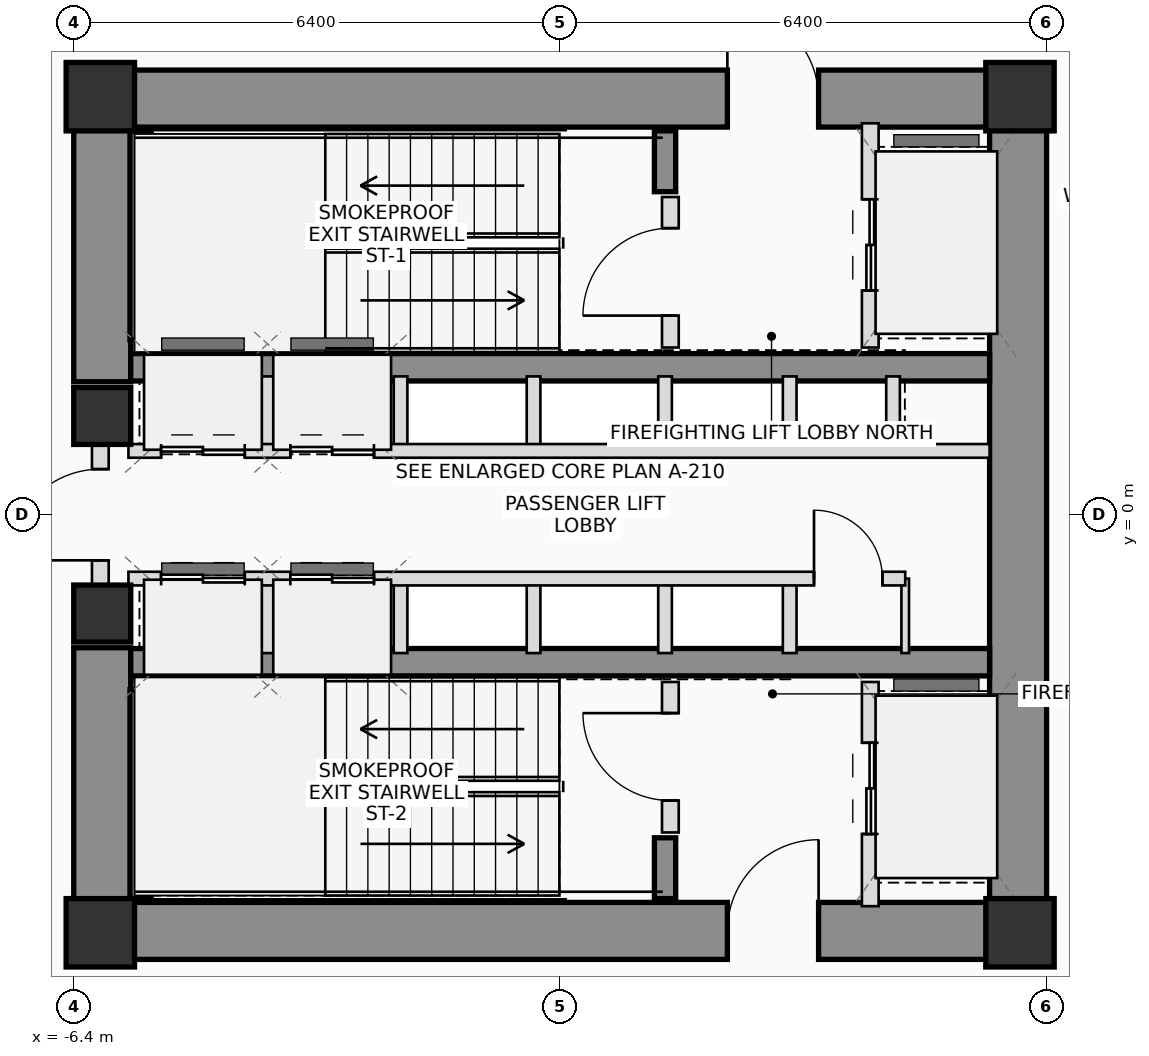
"""IFC4 building model, lengths in metres.
Left out: names, types, materials, properties, quantities, classifications, styles, units other than length and angle.
Written with IfcOpenShell. Run it as: python <this file> out.ifc"""

import sys

from ifc_helpers import new_model, si_unit, direction, frame, frame_2d, origin, origin_2d, place, context, subcontext, project, spatial, rectangle, extrude, source, transform, mapped, element, fill, save


model = new_model("IFC4")
c1 = context("Model", 3, precision=1e-05, world=origin(), true_north=direction((0.0, 1.0)))
c2 = subcontext(c1, "Body", "Model", "MODEL_VIEW")
j1 = project(units=[si_unit("LENGTHUNIT", "METRE"), si_unit("PLANEANGLEUNIT", "RADIAN")], contexts=[c1])
p1 = place(None, origin())
s1 = spatial("IfcSite", under=j1, at=p1, CompositionType="ELEMENT")
p2 = place(p1, origin())
s2 = spatial("IfcBuilding", under=s1, at=p2, CompositionType="ELEMENT")
p3 = place(p2, frame((0.0, 0.0, 116.15)))
s3 = spatial("IfcBuildingStorey", under=s2, at=p3, CompositionType="ELEMENT", Elevation=116.15)
m1 = source(origin(), c2, "Body", "SweptSolid", [
    extrude(rectangle(XDim=0.9, YDim=0.9, at=origin_2d()), origin(), (0.0, 0.0, 1.0), 3.75),
])
for number, where, z_axis, x_axis in (
    (1, (-6.05, -5.5, 0.0), (0.0, 0.0, 1.0), (1.0, 0.0, 0.0)),
    (2, (6.05, -5.5, 0.0), (0.0, 0.0, 1.0), (1.0, 0.0, 0.0)),
    (3, (6.05, 5.5, 0.0), (0.0, 0.0, 1.0), (1.0, 0.0, 0.0)),
    (4, (-6.05, 5.5, 0.0), (0.0, 0.0, 1.0), (1.0, 0.0, 0.0)),
):
    element("IfcColumn", number, at=place(p3, frame(where, z_axis=z_axis, x_axis=x_axis)), inside=s3, PredefinedType="COLUMN", context=c2, shape_type="MappedRepresentation", body=[
        mapped(m1, transform((0.0, 0.0, 0.0), scale=1.0)),
    ])
p4 = place(p3, frame((-6.4, 5.475, 0.0), z_axis=(0.0, 0.0, 1.0), x_axis=(1.0, 0.0, 0.0)))
e5 = element("IfcWall", 5, at=p4, inside=s3, PredefinedType="SHEAR", context=c2, shape_type="SweptSolid", body=[
    extrude(rectangle(XDim=12.8, YDim=0.75, at=frame_2d((6.4, 0.0))), origin(), (0.0, 0.0, 1.0), 3.75),
])
p5 = place(p4, frame((8.6, 0.0, 0.0)))
e6 = element("IfcOpeningElement", 6, at=p5, cuts=e5, PredefinedType="OPENING", context=c2, shape_type="SweptSolid", body=[
    extrude(rectangle(XDim=1.2, YDim=2.2, at=frame_2d((0.6, 1.1))), frame((0.0, 0.385, 0.0), z_axis=(0.0, -1.0, 0.0), x_axis=(1.0, 0.0, 0.0)), (0.0, 0.0, 1.0), 0.77),
])
p6 = place(p3, frame((-6.4, -5.475, 0.0), z_axis=(0.0, 0.0, 1.0), x_axis=(1.0, 0.0, 0.0)))
e7 = element("IfcWall", 7, at=p6, inside=s3, PredefinedType="SHEAR", context=c2, shape_type="SweptSolid", body=[
    extrude(rectangle(XDim=12.8, YDim=0.75, at=frame_2d((6.4, 0.0))), origin(), (0.0, 0.0, 1.0), 3.75),
])
p7 = place(p6, frame((8.6, 0.0, 0.0)))
e8 = element("IfcOpeningElement", 8, at=p7, cuts=e7, PredefinedType="OPENING", context=c2, shape_type="SweptSolid", body=[
    extrude(rectangle(XDim=1.2, YDim=2.2, at=frame_2d((0.6, 1.1))), frame((0.0, 0.385, 0.0), z_axis=(0.0, -1.0, 0.0), x_axis=(1.0, 0.0, 0.0)), (0.0, 0.0, 1.0), 0.77),
])
p8 = place(p3, frame((6.025, -5.1, 0.0), z_axis=(0.0, 0.0, 1.0), x_axis=(0.0, 1.0, 0.0)))
e9 = element("IfcWall", 9, at=p8, inside=s3, PredefinedType="SHEAR", context=c2, shape_type="SweptSolid", body=[
    extrude(rectangle(XDim=10.2, YDim=0.75, at=frame_2d((5.1, 0.0))), origin(), (0.0, 0.0, 1.0), 3.75),
])
for number, where, z_axis, x_axis in (
    (10, (-6.025, -5.1, 0.0), (0.0, 0.0, 1.0), (0.0, 1.0, 0.0)),
    (11, (-6.025, 1.75, 0.0), (0.0, 0.0, 1.0), (0.0, 1.0, 0.0)),
):
    element("IfcWall", number, at=place(p3, frame(where, z_axis=z_axis, x_axis=x_axis)), inside=s3, PredefinedType="SHEAR", context=c2, shape_type="SweptSolid", body=[
        extrude(rectangle(XDim=3.35, YDim=0.75, at=frame_2d((1.675, 0.0))), origin(), (0.0, 0.0, 1.0), 3.75),
    ])
for number, where, z_axis, x_axis in (
    (12, (-5.65, 1.94, 0.0), (0.0, 0.0, 1.0), (1.0, 0.0, 0.0)),
    (13, (-5.65, -1.94, 0.0), (0.0, 0.0, 1.0), (1.0, 0.0, 0.0)),
):
    element("IfcWall", number, at=place(p3, frame(where, z_axis=z_axis, x_axis=x_axis)), inside=s3, PredefinedType="SHEAR", context=c2, shape_type="SweptSolid", body=[
        extrude(rectangle(XDim=11.3, YDim=0.36, at=frame_2d((5.65, 0.0))), origin(), (0.0, 0.0, 1.0), 3.75),
    ])
p9 = place(p3, frame((-5.52, 2.3, 0.0), z_axis=(0.0, 0.0, 1.0), x_axis=(0.0, 1.0, 0.0)))
e14 = element("IfcWall", 14, at=p9, inside=s3, PredefinedType="SHEAR", context=c2, shape_type="SweptSolid", body=[
    extrude(rectangle(XDim=2.75, YDim=0.28, at=frame_2d((1.375, 0.0))), origin(), (0.0, 0.0, 1.0), 3.75),
])
p10 = place(p3, frame((1.38, 4.25, 0.0), z_axis=(0.0, 0.0, 1.0), x_axis=(0.0, 1.0, 0.0)))
e15 = element("IfcWall", 15, at=p10, inside=s3, PredefinedType="SHEAR", context=c2, shape_type="SweptSolid", body=[
    extrude(rectangle(XDim=0.8, YDim=0.28, at=frame_2d((0.4, 0.0))), origin(), (0.0, 0.0, 1.0), 3.75),
])
p11 = place(p3, frame((-5.52, -5.05, 0.0), z_axis=(0.0, 0.0, 1.0), x_axis=(0.0, 1.0, 0.0)))
e16 = element("IfcWall", 16, at=p11, inside=s3, PredefinedType="SHEAR", context=c2, shape_type="SweptSolid", body=[
    extrude(rectangle(XDim=2.75, YDim=0.28, at=frame_2d((1.375, 0.0))), origin(), (0.0, 0.0, 1.0), 3.75),
])
p12 = place(p3, frame((1.38, -5.05, 0.0), z_axis=(0.0, 0.0, 1.0), x_axis=(0.0, 1.0, 0.0)))
e17 = element("IfcWall", 17, at=p12, inside=s3, PredefinedType="SHEAR", context=c2, shape_type="SweptSolid", body=[
    extrude(rectangle(XDim=0.8, YDim=0.28, at=frame_2d((0.4, 0.0))), origin(), (0.0, 0.0, 1.0), 3.75),
])
m2 = source(origin(), c2, "Body", "SweptSolid", [
    extrude(rectangle(XDim=0.75, YDim=0.75, at=origin_2d()), origin(), (0.0, 0.0, 1.0), 3.75),
])
for number, where, z_axis, x_axis in (
    (18, (-6.025, -1.3, 0.0), (0.0, 0.0, 1.0), (1.0, 0.0, 0.0)),
    (19, (-6.025, 1.3, 0.0), (0.0, 0.0, 1.0), (1.0, 0.0, 0.0)),
):
    element("IfcColumn", number, at=place(p3, frame(where, z_axis=z_axis, x_axis=x_axis)), inside=s3, PredefinedType="COLUMN", context=c2, shape_type="MappedRepresentation", body=[
        mapped(m2, transform((0.0, 0.0, 0.0), scale=1.0)),
    ])
p13 = place(p3, frame((-6.05, -0.95, 0.0), z_axis=(0.0, 0.0, 1.0), x_axis=(0.0, 1.0, 0.0)))
e20 = element("IfcWall", 20, at=p13, inside=s3, PredefinedType="PLUMBINGWALL", context=c2, shape_type="SweptSolid", body=[
    extrude(rectangle(XDim=1.9, YDim=0.22, at=frame_2d((0.95, 0.0))), origin(), (0.0, 0.0, 1.0), 2.49),
])
p14 = place(p13, frame((0.35, 0.0, 0.0)))
e21 = element("IfcOpeningElement", 21, at=p14, cuts=e20, PredefinedType="OPENING", context=c2, shape_type="SweptSolid", body=[
    extrude(rectangle(XDim=1.2, YDim=2.2, at=frame_2d((0.6, 1.1))), frame((0.0, 0.12, 0.0), z_axis=(0.0, -1.0, 0.0), x_axis=(1.0, 0.0, 0.0)), (0.0, 0.0, 1.0), 0.24),
])
p15 = place(p3, frame((1.45, 2.2, 0.0), z_axis=(0.0, 0.0, 1.0), x_axis=(0.0, 1.0, 0.0)))
e22 = element("IfcWall", 22, at=p15, inside=s3, PredefinedType="PLUMBINGWALL", context=c2, shape_type="SweptSolid", body=[
    extrude(rectangle(XDim=1.98, YDim=0.22, at=frame_2d((0.99, 0.0))), origin(), (0.0, 0.0, 1.0), 3.51),
])
p16 = place(p15, frame((0.42, 0.0, 0.0)))
e23 = element("IfcOpeningElement", 23, at=p16, cuts=e22, PredefinedType="OPENING", context=c2, shape_type="SweptSolid", body=[
    extrude(rectangle(XDim=1.15, YDim=2.15, at=frame_2d((0.575, 1.075))), frame((0.0, 0.12, 0.0), z_axis=(0.0, -1.0, 0.0), x_axis=(1.0, 0.0, 0.0)), (0.0, 0.0, 1.0), 0.24),
])
p17 = place(p3, frame((4.08, 2.2, 0.0), z_axis=(0.0, 0.0, 1.0), x_axis=(0.0, 1.0, 0.0)))
e24 = element("IfcWall", 24, at=p17, inside=s3, PredefinedType="PLUMBINGWALL", context=c2, shape_type="SweptSolid", body=[
    extrude(rectangle(XDim=2.95, YDim=0.22, at=frame_2d((1.475, 0.0))), origin(), (0.0, 0.0, 1.0), 3.51),
])
p18 = place(p17, frame((0.75, 0.0, 0.0)))
e25 = element("IfcOpeningElement", 25, at=p18, cuts=e24, PredefinedType="OPENING", context=c2, shape_type="SweptSolid", body=[
    extrude(rectangle(XDim=1.2, YDim=2.25, at=frame_2d((0.6, 1.125))), frame((0.0, 0.12, 0.0), z_axis=(0.0, -1.0, 0.0), x_axis=(1.0, 0.0, 0.0)), (0.0, 0.0, 1.0), 0.24),
])
p19 = place(p3, frame((1.45, -4.18, 0.0), z_axis=(0.0, 0.0, 1.0), x_axis=(0.0, 1.0, 0.0)))
e26 = element("IfcWall", 26, at=p19, inside=s3, PredefinedType="PLUMBINGWALL", context=c2, shape_type="SweptSolid", body=[
    extrude(rectangle(XDim=1.98, YDim=0.22, at=frame_2d((0.99, 0.0))), origin(), (0.0, 0.0, 1.0), 3.51),
])
p20 = place(p19, frame((0.42, 0.0, 0.0)))
e27 = element("IfcOpeningElement", 27, at=p20, cuts=e26, PredefinedType="OPENING", context=c2, shape_type="SweptSolid", body=[
    extrude(rectangle(XDim=1.15, YDim=2.15, at=frame_2d((0.575, 1.075))), frame((0.0, 0.12, 0.0), z_axis=(0.0, -1.0, 0.0), x_axis=(1.0, 0.0, 0.0)), (0.0, 0.0, 1.0), 0.24),
])
p21 = place(p3, frame((4.08, -5.15, 0.0), z_axis=(0.0, 0.0, 1.0), x_axis=(0.0, 1.0, 0.0)))
e28 = element("IfcWall", 28, at=p21, inside=s3, PredefinedType="PLUMBINGWALL", context=c2, shape_type="SweptSolid", body=[
    extrude(rectangle(XDim=2.95, YDim=0.22, at=frame_2d((1.475, 0.0))), origin(), (0.0, 0.0, 1.0), 3.51),
])
p22 = place(p21, frame((0.95, 0.0, 0.0)))
e29 = element("IfcOpeningElement", 29, at=p22, cuts=e28, PredefinedType="OPENING", context=c2, shape_type="SweptSolid", body=[
    extrude(rectangle(XDim=1.2, YDim=2.25, at=frame_2d((0.6, 1.125))), frame((0.0, 0.12, 0.0), z_axis=(0.0, -1.0, 0.0), x_axis=(1.0, 0.0, 0.0)), (0.0, 0.0, 1.0), 0.24),
])
for number, where, z_axis, x_axis in (
    (30, (-3.85, 0.84, 0.0), (0.0, 0.0, 1.0), (0.0, 1.0, 0.0)),
    (31, (-3.85, -1.82, 0.0), (0.0, 0.0, 1.0), (0.0, 1.0, 0.0)),
    (32, (-2.1, 0.84, 0.0), (0.0, 0.0, 1.0), (0.0, 1.0, 0.0)),
    (33, (-2.1, -1.82, 0.0), (0.0, 0.0, 1.0), (0.0, 1.0, 0.0)),
    (34, (-0.35, 0.84, 0.0), (0.0, 0.0, 1.0), (0.0, 1.0, 0.0)),
    (35, (-0.35, -1.82, 0.0), (0.0, 0.0, 1.0), (0.0, 1.0, 0.0)),
    (36, (1.38, 0.84, 0.0), (0.0, 0.0, 1.0), (0.0, 1.0, 0.0)),
    (37, (1.38, -1.82, 0.0), (0.0, 0.0, 1.0), (0.0, 1.0, 0.0)),
    (38, (3.02, 0.84, 0.0), (0.0, 0.0, 1.0), (0.0, 1.0, 0.0)),
    (39, (4.38, 0.84, 0.0), (0.0, 0.0, 1.0), (0.0, 1.0, 0.0)),
    (40, (3.02, -1.82, 0.0), (0.0, 0.0, 1.0), (0.0, 1.0, 0.0)),
):
    element("IfcWall", number, at=place(p3, frame(where, z_axis=z_axis, x_axis=x_axis)), inside=s3, PredefinedType="PLUMBINGWALL", context=c2, shape_type="SweptSolid", body=[
        extrude(rectangle(XDim=0.98, YDim=0.18, at=frame_2d((0.49, 0.0))), origin(), (0.0, 0.0, 1.0), 3.51),
    ])
p23 = place(p3, frame((4.54, -1.82, 0.0), z_axis=(0.0, 0.0, 1.0), x_axis=(0.0, 1.0, 0.0)))
e41 = element("IfcWall", 41, at=p23, inside=s3, PredefinedType="PARTITIONING", context=c2, shape_type="SweptSolid", body=[
    extrude(rectangle(XDim=0.98, YDim=0.1, at=frame_2d((0.49, 0.0))), origin(), (0.0, 0.0, 1.0), 3.51),
])
p24 = place(p3, frame((-5.68, 0.84, 0.0), z_axis=(0.0, 0.0, 1.0), x_axis=(1.0, 0.0, 0.0)))
e42 = element("IfcWall", 42, at=p24, inside=s3, PredefinedType="PLUMBINGWALL", context=c2, shape_type="SweptSolid", body=[
    extrude(rectangle(XDim=11.33, YDim=0.18, at=frame_2d((5.665, 0.0))), origin(), (0.0, 0.0, 1.0), 3.51),
])
p25 = place(p24, frame((0.43, 0.0, 0.0)))
e43 = element("IfcOpeningElement", 43, at=p25, cuts=e42, PredefinedType="OPENING", context=c2, shape_type="SweptSolid", body=[
    extrude(rectangle(XDim=1.1, YDim=2.2, at=frame_2d((0.55, 1.1))), frame((0.0, 0.1, 0.0), z_axis=(0.0, -1.0, 0.0), x_axis=(1.0, 0.0, 0.0)), (0.0, 0.0, 1.0), 0.2),
])
p26 = place(p24, frame((2.13, 0.0, 0.0)))
e44 = element("IfcOpeningElement", 44, at=p26, cuts=e42, PredefinedType="OPENING", context=c2, shape_type="SweptSolid", body=[
    extrude(rectangle(XDim=1.1, YDim=2.2, at=frame_2d((0.55, 1.1))), frame((0.0, 0.1, 0.0), z_axis=(0.0, -1.0, 0.0), x_axis=(1.0, 0.0, 0.0)), (0.0, 0.0, 1.0), 0.2),
])
p27 = place(p3, frame((-5.68, -0.84, 0.0), z_axis=(0.0, 0.0, 1.0), x_axis=(1.0, 0.0, 0.0)))
e45 = element("IfcWall", 45, at=p27, inside=s3, PredefinedType="PLUMBINGWALL", context=c2, shape_type="SweptSolid", body=[
    extrude(rectangle(XDim=10.22, YDim=0.18, at=frame_2d((5.11, 0.0))), origin(), (0.0, 0.0, 1.0), 3.51),
])
p28 = place(p27, frame((0.43, 0.0, 0.0)))
e46 = element("IfcOpeningElement", 46, at=p28, cuts=e45, PredefinedType="OPENING", context=c2, shape_type="SweptSolid", body=[
    extrude(rectangle(XDim=1.1, YDim=2.2, at=frame_2d((0.55, 1.1))), frame((0.0, 0.1, 0.0), z_axis=(0.0, -1.0, 0.0), x_axis=(1.0, 0.0, 0.0)), (0.0, 0.0, 1.0), 0.2),
])
p29 = place(p27, frame((2.13, 0.0, 0.0)))
e47 = element("IfcOpeningElement", 47, at=p29, cuts=e45, PredefinedType="OPENING", context=c2, shape_type="SweptSolid", body=[
    extrude(rectangle(XDim=1.1, YDim=2.2, at=frame_2d((0.55, 1.1))), frame((0.0, 0.1, 0.0), z_axis=(0.0, -1.0, 0.0), x_axis=(1.0, 0.0, 0.0)), (0.0, 0.0, 1.0), 0.2),
])
p30 = place(p27, frame((9.02, 0.0, 0.0)))
e48 = element("IfcOpeningElement", 48, at=p30, cuts=e45, PredefinedType="OPENING", context=c2, shape_type="SweptSolid", body=[
    extrude(rectangle(XDim=0.9, YDim=2.05, at=frame_2d((0.45, 1.025))), frame((0.0, 0.1, 0.0), z_axis=(0.0, -1.0, 0.0), x_axis=(1.0, 0.0, 0.0)), (0.0, 0.0, 1.0), 0.2),
])
p31 = place(p3, frame((8.15, -6.099, 0.0), z_axis=(0.0, 0.0, 1.0), x_axis=(-0.725854359245, -0.687848420196, 0.0)))
e49 = element("IfcWall", 49, at=p31, inside=s3, PredefinedType="PARTITIONING", context=c2, shape_type="SweptSolid", body=[
    extrude(rectangle(XDim=2.479, YDim=0.16, at=frame_2d((1.24, 0.0))), origin(), (0.0, 0.0, 1.0), 2.815),
])
p32 = place(p5, origin())
e50 = element("IfcDoor", 50, at=p32, inside=s3, OperationType="SINGLE_SWING_LEFT", PredefinedType="DOOR", context=c2, shape_type="SweptSolid", body=[
    extrude(rectangle(XDim=1.2, YDim=2.2, at=frame_2d((0.6, 1.1))), frame((0.0, 0.025, 0.0), z_axis=(0.0, -1.0, 0.0), x_axis=(1.0, 0.0, 0.0)), (0.0, 0.0, 1.0), 0.05),
])
fill(e6, e50)
p33 = place(p7, origin())
e51 = element("IfcDoor", 51, at=p33, inside=s3, OperationType="SINGLE_SWING_RIGHT", PredefinedType="DOOR", context=c2, shape_type="SweptSolid", body=[
    extrude(rectangle(XDim=1.2, YDim=2.2, at=frame_2d((0.6, 1.1))), frame((0.0, 0.025, 0.0), z_axis=(0.0, -1.0, 0.0), x_axis=(1.0, 0.0, 0.0)), (0.0, 0.0, 1.0), 0.05),
])
fill(e8, e51)
p34 = place(p14, origin())
e52 = element("IfcDoor", 52, at=p34, inside=s3, OperationType="SINGLE_SWING_LEFT", PredefinedType="DOOR", context=c2, shape_type="SweptSolid", body=[
    extrude(rectangle(XDim=1.2, YDim=2.2, at=frame_2d((0.6, 1.1))), frame((0.0, 0.025, 0.0), z_axis=(0.0, -1.0, 0.0), x_axis=(1.0, 0.0, 0.0)), (0.0, 0.0, 1.0), 0.05),
])
fill(e21, e52)
p35 = place(p16, origin())
e53 = element("IfcDoor", 53, at=p35, inside=s3, OperationType="SINGLE_SWING_LEFT", PredefinedType="DOOR", context=c2, shape_type="SweptSolid", body=[
    extrude(rectangle(XDim=1.15, YDim=2.15, at=frame_2d((0.575, 1.075))), frame((0.0, 0.025, 0.0), z_axis=(0.0, -1.0, 0.0), x_axis=(1.0, 0.0, 0.0)), (0.0, 0.0, 1.0), 0.05),
])
fill(e23, e53)
p36 = place(p18, origin())
e54 = element("IfcDoor", 54, at=p36, inside=s3, OperationType="DOUBLE_DOOR_SLIDING", PredefinedType="DOOR", context=c2, shape_type="SweptSolid", body=[
    extrude(rectangle(XDim=1.2, YDim=2.25, at=frame_2d((0.6, 1.125))), frame((0.0, 0.025, 0.0), z_axis=(0.0, -1.0, 0.0), x_axis=(1.0, 0.0, 0.0)), (0.0, 0.0, 1.0), 0.05),
])
fill(e25, e54)
p37 = place(p20, origin())
e55 = element("IfcDoor", 55, at=p37, inside=s3, OperationType="SINGLE_SWING_RIGHT", PredefinedType="DOOR", context=c2, shape_type="SweptSolid", body=[
    extrude(rectangle(XDim=1.15, YDim=2.15, at=frame_2d((0.575, 1.075))), frame((0.0, 0.025, 0.0), z_axis=(0.0, -1.0, 0.0), x_axis=(1.0, 0.0, 0.0)), (0.0, 0.0, 1.0), 0.05),
])
fill(e27, e55)
p38 = place(p22, origin())
e56 = element("IfcDoor", 56, at=p38, inside=s3, OperationType="DOUBLE_DOOR_SLIDING", PredefinedType="DOOR", context=c2, shape_type="SweptSolid", body=[
    extrude(rectangle(XDim=1.2, YDim=2.25, at=frame_2d((0.6, 1.125))), frame((0.0, 0.025, 0.0), z_axis=(0.0, -1.0, 0.0), x_axis=(1.0, 0.0, 0.0)), (0.0, 0.0, 1.0), 0.05),
])
fill(e29, e56)
p39 = place(p25, origin())
e57 = element("IfcDoor", 57, at=p39, inside=s3, OperationType="DOUBLE_DOOR_SLIDING", PredefinedType="DOOR", context=c2, shape_type="SweptSolid", body=[
    extrude(rectangle(XDim=1.1, YDim=2.2, at=frame_2d((0.55, 1.1))), frame((0.0, 0.025, 0.0), z_axis=(0.0, -1.0, 0.0), x_axis=(1.0, 0.0, 0.0)), (0.0, 0.0, 1.0), 0.05),
])
fill(e43, e57)
p40 = place(p26, origin())
e58 = element("IfcDoor", 58, at=p40, inside=s3, OperationType="DOUBLE_DOOR_SLIDING", PredefinedType="DOOR", context=c2, shape_type="SweptSolid", body=[
    extrude(rectangle(XDim=1.1, YDim=2.2, at=frame_2d((0.55, 1.1))), frame((0.0, 0.025, 0.0), z_axis=(0.0, -1.0, 0.0), x_axis=(1.0, 0.0, 0.0)), (0.0, 0.0, 1.0), 0.05),
])
fill(e44, e58)
p41 = place(p28, origin())
e59 = element("IfcDoor", 59, at=p41, inside=s3, OperationType="DOUBLE_DOOR_SLIDING", PredefinedType="DOOR", context=c2, shape_type="SweptSolid", body=[
    extrude(rectangle(XDim=1.1, YDim=2.2, at=frame_2d((0.55, 1.1))), frame((0.0, 0.025, 0.0), z_axis=(0.0, -1.0, 0.0), x_axis=(1.0, 0.0, 0.0)), (0.0, 0.0, 1.0), 0.05),
])
fill(e46, e59)
p42 = place(p29, origin())
e60 = element("IfcDoor", 60, at=p42, inside=s3, OperationType="DOUBLE_DOOR_SLIDING", PredefinedType="DOOR", context=c2, shape_type="SweptSolid", body=[
    extrude(rectangle(XDim=1.1, YDim=2.2, at=frame_2d((0.55, 1.1))), frame((0.0, 0.025, 0.0), z_axis=(0.0, -1.0, 0.0), x_axis=(1.0, 0.0, 0.0)), (0.0, 0.0, 1.0), 0.05),
])
fill(e47, e60)
p43 = place(p30, origin())
e61 = element("IfcDoor", 61, at=p43, inside=s3, OperationType="SINGLE_SWING_LEFT", PredefinedType="DOOR", context=c2, shape_type="SweptSolid", body=[
    extrude(rectangle(XDim=0.9, YDim=2.05, at=frame_2d((0.45, 1.025))), frame((0.0, 0.025, 0.0), z_axis=(0.0, -1.0, 0.0), x_axis=(1.0, 0.0, 0.0)), (0.0, 0.0, 1.0), 0.05),
])
fill(e48, e61)
save(model, sys.argv[1])
